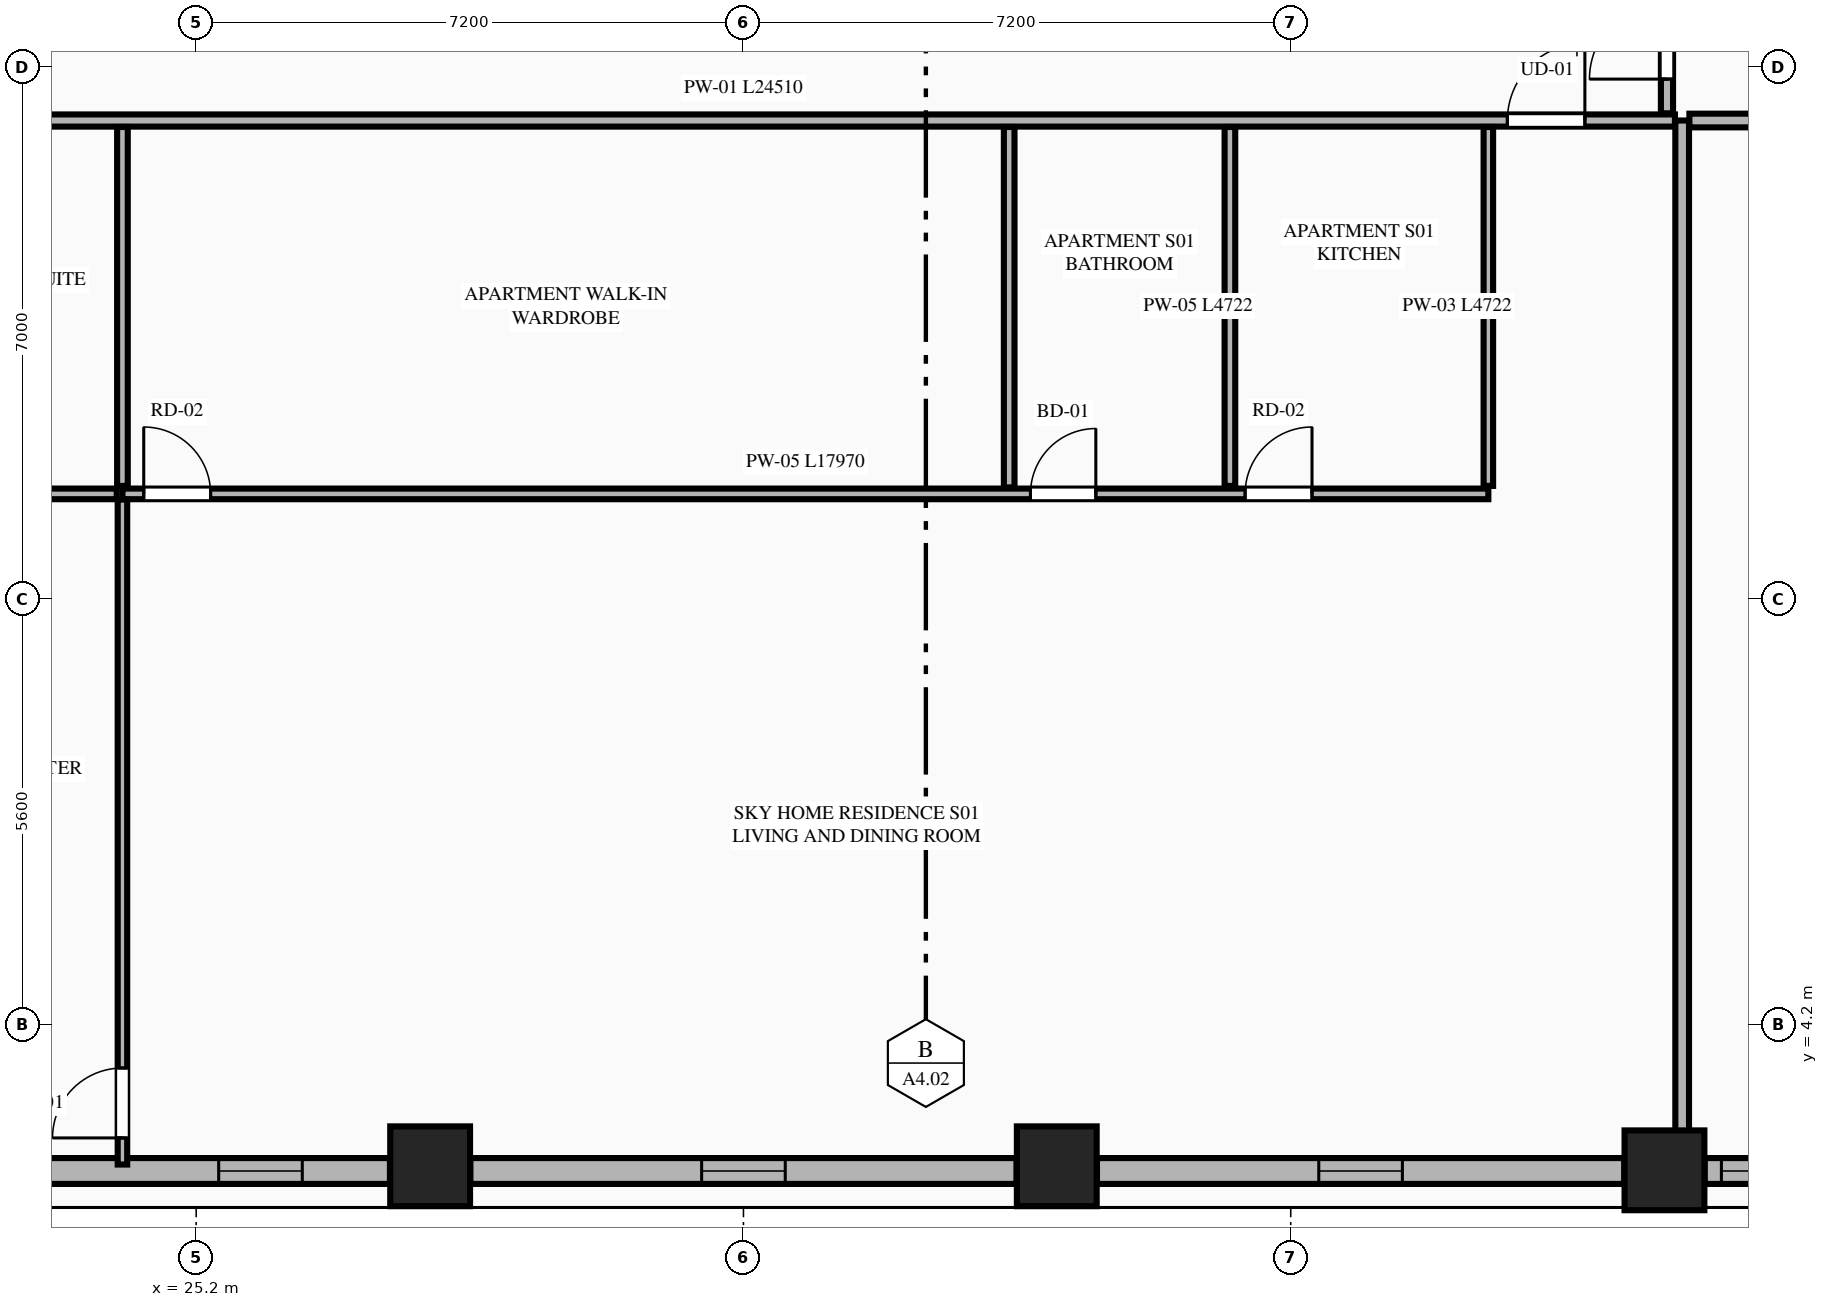
"""IFC4 building model, lengths in metres.
Left out: names, types, materials, properties, quantities, classifications, styles, units other than length and angle.
Written with IfcOpenShell. Run it as: python <this file> out.ifc"""

import sys

from ifc_helpers import new_model, si_unit, direction, frame, frame_2d, origin, origin_2d, place, context, subcontext, project, spatial, rectangle, extrude, element, fill, save


model = new_model("IFC4")
c1 = context("Model", 3, precision=1e-05, world=origin(), true_north=direction((0.0, 1.0)))
c2 = subcontext(c1, "Body", "Model", "MODEL_VIEW")
j1 = project(units=[si_unit("LENGTHUNIT", "METRE"), si_unit("PLANEANGLEUNIT", "RADIAN")], contexts=[c1])
p1 = place(None, origin())
s1 = spatial("IfcSite", under=j1, at=p1, CompositionType="ELEMENT")
p2 = place(p1, origin())
s2 = spatial("IfcBuilding", under=s1, at=p2, CompositionType="ELEMENT")
p3 = place(p2, frame((0.0, 0.0, 83.55)))
s3 = spatial("IfcBuildingStorey", under=s2, at=p3, CompositionType="ELEMENT", Elevation=83.55)
for number, where, z_axis, x_axis in (
    (1, (28.278, 2.342, 0.0), (0.0, 0.0, 1.0), (1.0, 0.0, 0.0)),
    (2, (36.522, 2.342, 0.0), (0.0, 0.0, 1.0), (1.0, 0.0, 0.0)),
    (3, (44.517, 2.289, 0.0), (0.0, 0.0, 1.0), (1.0, 0.0, 0.0)),
):
    element("IfcColumn", number, at=place(p3, frame(where, z_axis=z_axis, x_axis=x_axis)), inside=s3, PredefinedType="COLUMN", context=c2, shape_type="SweptSolid", body=[
        extrude(rectangle(XDim=1.05, YDim=1.05, at=origin_2d()), origin(), (0.0, 0.0, 1.0), 3.55),
    ])
p4 = place(p3, frame((20.812, 2.28, 0.0), z_axis=(0.0, 0.0, 1.0), x_axis=(1.0, 0.0, 0.0)))
e4 = element("IfcWall", 4, at=p4, inside=s3, PredefinedType="STANDARD", context=c2, shape_type="SweptSolid", body=[
    extrude(rectangle(XDim=6.937, YDim=0.34, at=frame_2d((3.469, 0.0))), origin(), (0.0, 0.0, 1.0), 2.787),
])
p5 = place(p4, frame((1.103, 0.0, 0.75)))
e5 = element("IfcOpeningElement", 5, at=p5, cuts=e4, PredefinedType="OPENING", context=c2, shape_type="SweptSolid", body=[
    extrude(rectangle(XDim=1.1, YDim=1.887, at=frame_2d((0.55, 0.943))), frame((0.0, 0.18, 0.0), z_axis=(0.0, -1.0, 0.0), x_axis=(1.0, 0.0, 0.0)), (0.0, 0.0, 1.0), 0.36),
])
p6 = place(p4, frame((4.684, 0.0, 0.75)))
e6 = element("IfcOpeningElement", 6, at=p6, cuts=e4, PredefinedType="OPENING", context=c2, shape_type="SweptSolid", body=[
    extrude(rectangle(XDim=1.1, YDim=1.887, at=frame_2d((0.55, 0.943))), frame((0.0, 0.18, 0.0), z_axis=(0.0, -1.0, 0.0), x_axis=(1.0, 0.0, 0.0)), (0.0, 0.0, 1.0), 0.36),
])
p7 = place(p3, frame((28.807, 2.28, 0.0), z_axis=(0.0, 0.0, 1.0), x_axis=(1.0, 0.0, 0.0)))
e7 = element("IfcWall", 7, at=p7, inside=s3, PredefinedType="STANDARD", context=c2, shape_type="SweptSolid", body=[
    extrude(rectangle(XDim=7.186, YDim=0.34, at=frame_2d((3.593, 0.0))), origin(), (0.0, 0.0, 1.0), 2.787),
])
p8 = place(p7, frame((3.043, 0.0, 0.75)))
e8 = element("IfcOpeningElement", 8, at=p8, cuts=e7, PredefinedType="OPENING", context=c2, shape_type="SweptSolid", body=[
    extrude(rectangle(XDim=1.1, YDim=1.887, at=frame_2d((0.55, 0.943))), frame((0.0, 0.18, 0.0), z_axis=(0.0, -1.0, 0.0), x_axis=(1.0, 0.0, 0.0)), (0.0, 0.0, 1.0), 0.36),
])
p9 = place(p3, frame((37.051, 2.28, 0.0), z_axis=(0.0, 0.0, 1.0), x_axis=(1.0, 0.0, 0.0)))
e9 = element("IfcWall", 9, at=p9, inside=s3, PredefinedType="STANDARD", context=c2, shape_type="SweptSolid", body=[
    extrude(rectangle(XDim=6.937, YDim=0.34, at=frame_2d((3.469, 0.0))), origin(), (0.0, 0.0, 1.0), 2.787),
])
p10 = place(p9, frame((2.918, 0.0, 0.75)))
e10 = element("IfcOpeningElement", 10, at=p10, cuts=e9, PredefinedType="OPENING", context=c2, shape_type="SweptSolid", body=[
    extrude(rectangle(XDim=1.1, YDim=1.887, at=frame_2d((0.55, 0.943))), frame((0.0, 0.18, 0.0), z_axis=(0.0, -1.0, 0.0), x_axis=(1.0, 0.0, 0.0)), (0.0, 0.0, 1.0), 0.36),
])
p11 = place(p3, frame((45.046, 2.28, 0.0), z_axis=(0.0, 0.0, 1.0), x_axis=(1.0, 0.0, 0.0)))
e11 = element("IfcWall", 11, at=p11, inside=s3, PredefinedType="STANDARD", context=c2, shape_type="SweptSolid", body=[
    extrude(rectangle(XDim=1.32, YDim=0.34, at=frame_2d((0.66, 0.0))), origin(), (0.0, 0.0, 1.0), 3.33),
])
p12 = place(p11, frame((0.22, 0.0, 0.75)))
e12 = element("IfcOpeningElement", 12, at=p12, cuts=e11, PredefinedType="OPENING", context=c2, shape_type="SweptSolid", body=[
    extrude(rectangle(XDim=0.88, YDim=2.0, at=frame_2d((0.44, 1.0))), frame((0.0, 0.18, 0.0), z_axis=(0.0, -1.0, 0.0), x_axis=(1.0, 0.0, 0.0)), (0.0, 0.0, 1.0), 0.36),
])
p13 = place(p3, frame((44.75, 2.455, 0.0), z_axis=(0.0, 0.0, 1.0), x_axis=(0.0, 1.0, 0.0)))
e13 = element("IfcWall", 13, at=p13, inside=s3, PredefinedType="PARTITIONING", context=c2, shape_type="SweptSolid", body=[
    extrude(rectangle(XDim=13.645, YDim=0.18, at=frame_2d((6.823, 0.0))), origin(), (0.0, 0.0, 1.0), 3.33),
])
p14 = place(p3, frame((20.145, 16.1, 0.0), z_axis=(0.0, 0.0, 1.0), x_axis=(1.0, 0.0, 0.0)))
e14 = element("IfcWall", 14, at=p14, inside=s3, PredefinedType="PARTITIONING", context=c2, shape_type="SweptSolid", body=[
    extrude(rectangle(XDim=24.51, YDim=0.16, at=frame_2d((12.255, 0.0))), origin(), (0.0, 0.0, 1.0), 3.33),
])
p15 = place(p14, frame((22.305, 0.0, 0.0)))
e15 = element("IfcOpeningElement", 15, at=p15, cuts=e14, PredefinedType="OPENING", context=c2, shape_type="SweptSolid", body=[
    extrude(rectangle(XDim=1.02, YDim=2.25, at=frame_2d((0.51, 1.125))), frame((0.0, 0.09, 0.0), z_axis=(0.0, -1.0, 0.0), x_axis=(1.0, 0.0, 0.0)), (0.0, 0.0, 1.0), 0.18),
])
p16 = place(p3, frame((42.2, 11.293, 0.0), z_axis=(0.0, 0.0, 1.0), x_axis=(0.0, 1.0, 0.0)))
e16 = element("IfcWall", 16, at=p16, inside=s3, PredefinedType="PARTITIONING", context=c2, shape_type="SweptSolid", body=[
    extrude(rectangle(XDim=4.722, YDim=0.125, at=frame_2d((2.361, 0.0))), origin(), (0.0, 0.0, 1.0), 2.636),
])
p17 = place(p3, frame((24.23, 11.188, 0.0), z_axis=(0.0, 0.0, 1.0), x_axis=(1.0, 0.0, 0.0)))
e17 = element("IfcWall", 17, at=p17, inside=s3, PredefinedType="PLUMBINGWALL", context=c2, shape_type="SweptSolid", body=[
    extrude(rectangle(XDim=17.97, YDim=0.14, at=frame_2d((8.985, 0.0))), origin(), (0.0, 0.0, 1.0), 3.33),
])
p18 = place(p17, frame((0.28, 0.0, 0.0)))
e18 = element("IfcOpeningElement", 18, at=p18, cuts=e17, PredefinedType="OPENING", context=c2, shape_type="SweptSolid", body=[
    extrude(rectangle(XDim=0.88, YDim=2.15, at=frame_2d((0.44, 1.075))), frame((0.0, 0.08, 0.0), z_axis=(0.0, -1.0, 0.0), x_axis=(1.0, 0.0, 0.0)), (0.0, 0.0, 1.0), 0.16),
])
p19 = place(p17, frame((11.946, 0.0, 0.0)))
e19 = element("IfcOpeningElement", 19, at=p19, cuts=e17, PredefinedType="OPENING", context=c2, shape_type="SweptSolid", body=[
    extrude(rectangle(XDim=0.86, YDim=2.1, at=frame_2d((0.43, 1.05))), frame((0.0, 0.08, 0.0), z_axis=(0.0, -1.0, 0.0), x_axis=(1.0, 0.0, 0.0)), (0.0, 0.0, 1.0), 0.16),
])
p20 = place(p17, frame((14.77, 0.0, 0.0)))
e20 = element("IfcOpeningElement", 20, at=p20, cuts=e17, PredefinedType="OPENING", context=c2, shape_type="SweptSolid", body=[
    extrude(rectangle(XDim=0.88, YDim=2.15, at=frame_2d((0.44, 1.075))), frame((0.0, 0.08, 0.0), z_axis=(0.0, -1.0, 0.0), x_axis=(1.0, 0.0, 0.0)), (0.0, 0.0, 1.0), 0.16),
])
p21 = place(p3, frame((20.145, 11.188, 0.0), z_axis=(0.0, 0.0, 1.0), x_axis=(1.0, 0.0, 0.0)))
e21 = element("IfcWall", 21, at=p21, inside=s3, PredefinedType="PLUMBINGWALL", context=c2, shape_type="SweptSolid", body=[
    extrude(rectangle(XDim=4.01, YDim=0.14, at=frame_2d((2.005, 0.0))), origin(), (0.0, 0.0, 1.0), 3.33),
])
p22 = place(p21, frame((1.58, 0.0, 0.0)))
e22 = element("IfcOpeningElement", 22, at=p22, cuts=e21, PredefinedType="OPENING", context=c2, shape_type="SweptSolid", body=[
    extrude(rectangle(XDim=0.86, YDim=2.1, at=frame_2d((0.43, 1.05))), frame((0.0, 0.08, 0.0), z_axis=(0.0, -1.0, 0.0), x_axis=(1.0, 0.0, 0.0)), (0.0, 0.0, 1.0), 0.16),
])
for number, where, z_axis, x_axis in (
    (23, (38.8, 11.293, 0.0), (0.0, 0.0, 1.0), (0.0, 1.0, 0.0)),
    (24, (24.23, 11.293, 0.0), (0.0, 0.0, 1.0), (0.0, 1.0, 0.0)),
):
    element("IfcWall", number, at=place(p3, frame(where, z_axis=z_axis, x_axis=x_axis)), inside=s3, PredefinedType="PLUMBINGWALL", context=c2, shape_type="SweptSolid", body=[
        extrude(rectangle(XDim=4.722, YDim=0.14, at=frame_2d((2.361, 0.0))), origin(), (0.0, 0.0, 1.0), 3.33),
    ])
p23 = place(p3, frame((24.23, 2.365, 0.0), z_axis=(0.0, 0.0, 1.0), x_axis=(0.0, 1.0, 0.0)))
e25 = element("IfcWall", 25, at=p23, inside=s3, PredefinedType="PARTITIONING", context=c2, shape_type="SweptSolid", body=[
    extrude(rectangle(XDim=8.748, YDim=0.125, at=frame_2d((4.374, 0.0))), origin(), (0.0, 0.0, 1.0), 3.33),
])
p24 = place(p23, frame((0.35, 0.0, 0.0)))
e26 = element("IfcOpeningElement", 26, at=p24, cuts=e25, PredefinedType="OPENING", context=c2, shape_type="SweptSolid", body=[
    extrude(rectangle(XDim=0.92, YDim=2.15, at=frame_2d((0.46, 1.075))), frame((0.0, 0.073, 0.0), z_axis=(0.0, -1.0, 0.0), x_axis=(1.0, 0.0, 0.0)), (0.0, 0.0, 1.0), 0.145),
])
p25 = place(p3, frame((35.896, 11.273, 0.0), z_axis=(0.0, 0.0, 1.0), x_axis=(0.0, 1.0, 0.0)))
e27 = element("IfcWall", 27, at=p25, inside=s3, PredefinedType="PLUMBINGWALL", context=c2, shape_type="SweptSolid", body=[
    extrude(rectangle(XDim=4.742, YDim=0.14, at=frame_2d((2.371, 0.0))), origin(), (0.0, 0.0, 1.0), 3.33),
])
p26 = place(p3, frame((44.845, 16.1, 0.0), z_axis=(0.0, 0.0, 1.0), x_axis=(1.0, 0.0, 0.0)))
e28 = element("IfcWall", 28, at=p26, inside=s3, PredefinedType="PARTITIONING", context=c2, shape_type="SweptSolid", body=[
    extrude(rectangle(XDim=9.467, YDim=0.18, at=frame_2d((4.733, 0.0))), origin(), (0.0, 0.0, 1.0), 3.33),
])
p27 = place(p3, frame((44.55, 16.195, 0.0), z_axis=(0.0, 0.0, 1.0), x_axis=(0.0, 1.0, 0.0)))
e29 = element("IfcWall", 29, at=p27, inside=s3, PredefinedType="PARTITIONING", context=c2, shape_type="SweptSolid", body=[
    extrude(rectangle(XDim=19.41, YDim=0.16, at=frame_2d((9.705, 0.0))), origin(), (0.0, 0.0, 1.0), 2.636),
])
p28 = place(p27, frame((0.45, 0.0, 0.0)))
e30 = element("IfcOpeningElement", 30, at=p28, cuts=e29, PredefinedType="OPENING", context=c2, shape_type="SweptSolid", body=[
    extrude(rectangle(XDim=1.02, YDim=2.25, at=frame_2d((0.51, 1.125))), frame((0.0, 0.09, 0.0), z_axis=(0.0, -1.0, 0.0), x_axis=(1.0, 0.0, 0.0)), (0.0, 0.0, 1.0), 0.18),
])
p29 = place(p8, origin())
e31 = element("IfcWindow", 31, at=p29, inside=s3, PartitioningType="SINGLE_PANEL", PredefinedType="WINDOW", context=c2, shape_type="SweptSolid", body=[
    extrude(rectangle(XDim=1.1, YDim=1.887, at=frame_2d((0.55, 0.943))), frame((0.0, 0.03, 0.0), z_axis=(0.0, -1.0, 0.0), x_axis=(1.0, 0.0, 0.0)), (0.0, 0.0, 1.0), 0.06),
])
fill(e8, e31)
p30 = place(p10, origin())
e32 = element("IfcWindow", 32, at=p30, inside=s3, PartitioningType="SINGLE_PANEL", PredefinedType="WINDOW", context=c2, shape_type="SweptSolid", body=[
    extrude(rectangle(XDim=1.1, YDim=1.887, at=frame_2d((0.55, 0.943))), frame((0.0, 0.03, 0.0), z_axis=(0.0, -1.0, 0.0), x_axis=(1.0, 0.0, 0.0)), (0.0, 0.0, 1.0), 0.06),
])
fill(e10, e32)
p31 = place(p18, origin())
e33 = element("IfcDoor", 33, at=p31, inside=s3, OperationType="SINGLE_SWING_LEFT", PredefinedType="DOOR", context=c2, shape_type="SweptSolid", body=[
    extrude(rectangle(XDim=0.88, YDim=2.15, at=frame_2d((0.44, 1.075))), frame((0.0, 0.025, 0.0), z_axis=(0.0, -1.0, 0.0), x_axis=(1.0, 0.0, 0.0)), (0.0, 0.0, 1.0), 0.05),
])
fill(e18, e33)
p32 = place(p19, origin())
e34 = element("IfcDoor", 34, at=p32, inside=s3, OperationType="SINGLE_SWING_RIGHT", PredefinedType="DOOR", context=c2, shape_type="SweptSolid", body=[
    extrude(rectangle(XDim=0.86, YDim=2.1, at=frame_2d((0.43, 1.05))), frame((0.0, 0.025, 0.0), z_axis=(0.0, -1.0, 0.0), x_axis=(1.0, 0.0, 0.0)), (0.0, 0.0, 1.0), 0.05),
])
fill(e19, e34)
p33 = place(p15, origin())
e35 = element("IfcDoor", 35, at=p33, inside=s3, OperationType="SINGLE_SWING_RIGHT", PredefinedType="DOOR", context=c2, shape_type="SweptSolid", body=[
    extrude(rectangle(XDim=1.02, YDim=2.25, at=frame_2d((0.51, 1.125))), frame((0.0, 0.025, 0.0), z_axis=(0.0, -1.0, 0.0), x_axis=(1.0, 0.0, 0.0)), (0.0, 0.0, 1.0), 0.05),
])
fill(e15, e35)
p34 = place(p20, origin())
e36 = element("IfcDoor", 36, at=p34, inside=s3, OperationType="SINGLE_SWING_RIGHT", PredefinedType="DOOR", context=c2, shape_type="SweptSolid", body=[
    extrude(rectangle(XDim=0.88, YDim=2.15, at=frame_2d((0.44, 1.075))), frame((0.0, 0.025, 0.0), z_axis=(0.0, -1.0, 0.0), x_axis=(1.0, 0.0, 0.0)), (0.0, 0.0, 1.0), 0.05),
])
fill(e20, e36)
p35 = place(p24, origin())
e37 = element("IfcDoor", 37, at=p35, inside=s3, OperationType="SINGLE_SWING_LEFT", PredefinedType="DOOR", context=c2, shape_type="SweptSolid", body=[
    extrude(rectangle(XDim=0.92, YDim=2.15, at=frame_2d((0.46, 1.075))), frame((0.0, 0.025, 0.0), z_axis=(0.0, -1.0, 0.0), x_axis=(1.0, 0.0, 0.0)), (0.0, 0.0, 1.0), 0.05),
])
fill(e26, e37)
p36 = place(p28, origin())
e38 = element("IfcDoor", 38, at=p36, inside=s3, OperationType="SINGLE_SWING_LEFT", PredefinedType="DOOR", context=c2, shape_type="SweptSolid", body=[
    extrude(rectangle(XDim=1.02, YDim=2.25, at=frame_2d((0.51, 1.125))), frame((0.0, 0.025, 0.0), z_axis=(0.0, -1.0, 0.0), x_axis=(1.0, 0.0, 0.0)), (0.0, 0.0, 1.0), 0.05),
])
fill(e30, e38)
p37 = place(p6, origin())
e39 = element("IfcWindow", 39, at=p37, inside=s3, PartitioningType="SINGLE_PANEL", PredefinedType="WINDOW", context=c2, shape_type="SweptSolid", body=[
    extrude(rectangle(XDim=1.1, YDim=1.887, at=frame_2d((0.55, 0.943))), frame((0.0, 0.03, 0.0), z_axis=(0.0, -1.0, 0.0), x_axis=(1.0, 0.0, 0.0)), (0.0, 0.0, 1.0), 0.06),
])
fill(e6, e39)
p38 = place(p12, origin())
e40 = element("IfcWindow", 40, at=p38, inside=s3, PartitioningType="SINGLE_PANEL", PredefinedType="WINDOW", context=c2, shape_type="SweptSolid", body=[
    extrude(rectangle(XDim=0.88, YDim=2.0, at=frame_2d((0.44, 1.0))), frame((0.0, 0.03, 0.0), z_axis=(0.0, -1.0, 0.0), x_axis=(1.0, 0.0, 0.0)), (0.0, 0.0, 1.0), 0.06),
])
fill(e12, e40)
save(model, sys.argv[1])
